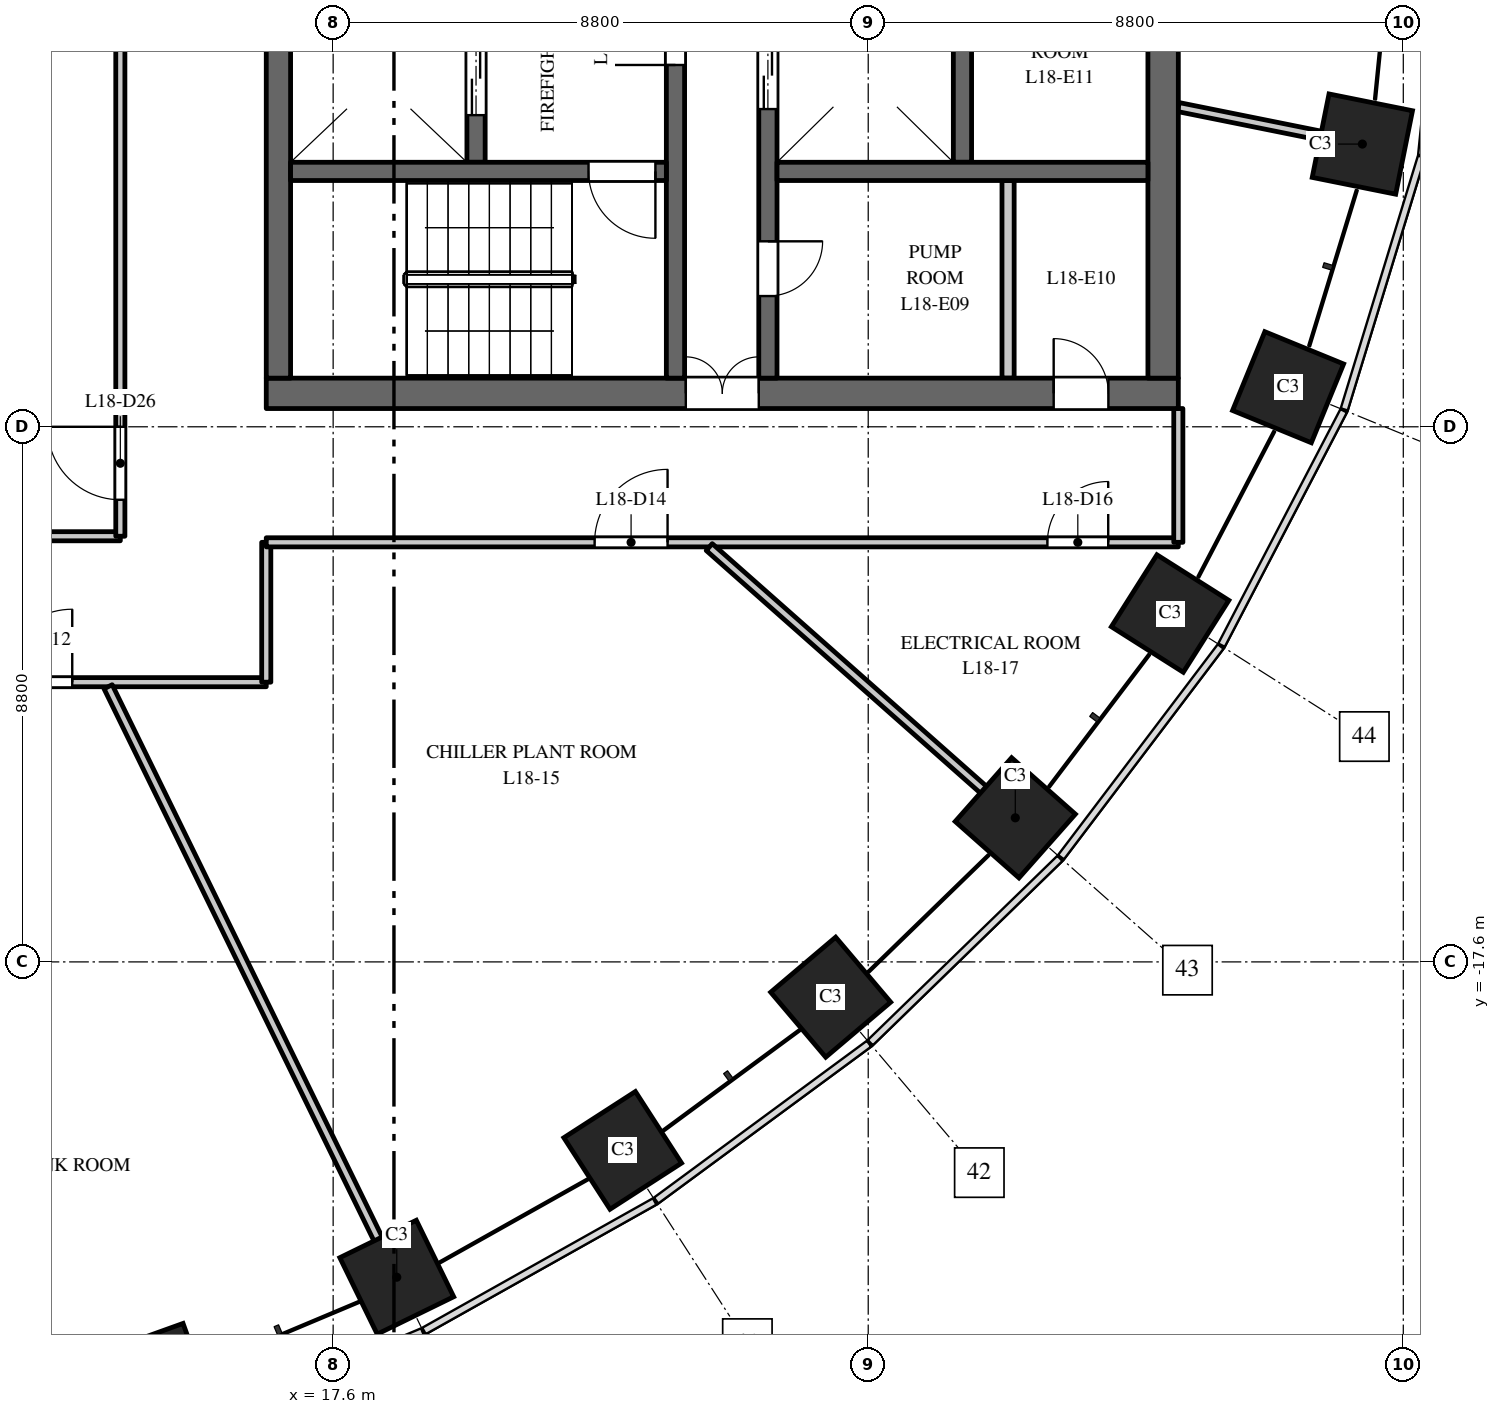
"""IFC4 building model, lengths in metres.
Left out: names, types, materials, properties, quantities, classifications, styles, units other than length and angle.
Written with IfcOpenShell. Run it as: python <this file> out.ifc"""

import sys

from ifc_helpers import new_model, si_unit, direction, frame, frame_2d, origin, origin_2d, place, context, subcontext, project, spatial, rectangle, extrude, element, fill, save


model = new_model("IFC4")
c1 = context("Model", 3, precision=1e-05, world=origin(), true_north=direction((0.0, 1.0)))
c2 = subcontext(c1, "Body", "Model", "MODEL_VIEW")
j1 = project(units=[si_unit("LENGTHUNIT", "METRE"), si_unit("PLANEANGLEUNIT", "RADIAN")], contexts=[c1])
p1 = place(None, origin())
s1 = spatial("IfcSite", under=j1, at=p1, CompositionType="ELEMENT")
p2 = place(p1, origin())
s2 = spatial("IfcBuilding", under=s1, at=p2, CompositionType="ELEMENT")
p3 = place(p2, frame((0.0, 0.0, 82.5)))
s3 = spatial("IfcBuildingStorey", under=s2, at=p3, CompositionType="ELEMENT", Elevation=82.5)
for number, where, z_axis, x_axis in (
    (1, (14.709, -24.441, 0.0), (0.0, 0.0, 1.0), (0.941, 0.338, 0.0)),
    (2, (18.646, -22.785, 0.0), (0.0, 0.0, 1.0), (0.898, 0.439, 0.0)),
    (3, (22.362, -20.7, 0.0), (0.0, 0.0, 1.0), (0.84, 0.542, 0.0)),
    (4, (25.783, -18.18, 0.0), (0.0, 0.0, 1.0), (0.763, 0.646, 0.0)),
    (5, (28.819, -15.23, 0.0), (0.0, 0.0, 1.0), (0.663, 0.749, 0.0)),
    (6, (31.365, -11.871, 0.0), (0.0, 0.0, 1.0), (0.535, 0.845, 0.0)),
    (7, (33.305, -8.149, 0.0), (0.0, 0.0, 1.0), (0.379, 0.925, 0.0)),
    (8, (34.527, -4.151, 0.0), (0.0, 0.0, 1.0), (0.197, 0.98, 0.0)),
):
    element("IfcColumn", number, at=place(p3, frame(where, z_axis=z_axis, x_axis=x_axis)), inside=s3, PredefinedType="COLUMN", context=c2, shape_type="SweptSolid", body=[
        extrude(rectangle(XDim=1.4, YDim=1.4, at=origin_2d()), origin(), (0.0, 0.0, 1.0), 5.5),
    ])
p4 = place(p3, frame((16.5, -8.25, 0.0), z_axis=(0.0, 0.0, 1.0), x_axis=(1.0, 0.0, 0.0)))
e9 = element("IfcWall", 9, at=p4, inside=s3, PredefinedType="SHEAR", context=c2, shape_type="SweptSolid", body=[
    extrude(rectangle(XDim=15.0, YDim=0.5, at=frame_2d((7.5, 0.0))), origin(), (0.0, 0.0, 1.0), 5.2),
])
p5 = place(p4, frame((6.9, 0.0, 0.0)))
e10 = element("IfcOpeningElement", 10, at=p5, cuts=e9, PredefinedType="OPENING", context=c2, shape_type="SweptSolid", body=[
    extrude(rectangle(XDim=1.2, YDim=2.1, at=frame_2d((0.6, 1.05))), frame((0.0, 0.26, 0.0), z_axis=(0.0, -1.0, 0.0), x_axis=(1.0, 0.0, 0.0)), (0.0, 0.0, 1.0), 0.52),
])
p6 = place(p4, frame((12.95, 0.0, 0.0)))
e11 = element("IfcOpeningElement", 11, at=p6, cuts=e9, PredefinedType="OPENING", context=c2, shape_type="SweptSolid", body=[
    extrude(rectangle(XDim=0.9, YDim=2.1, at=frame_2d((0.45, 1.05))), frame((0.0, 0.26, 0.0), z_axis=(0.0, -1.0, 0.0), x_axis=(1.0, 0.0, 0.0)), (0.0, 0.0, 1.0), 0.52),
])
p7 = place(p3, frame((27.95, -4.45, 0.0), z_axis=(0.0, 0.0, 1.0), x_axis=(0.0, 1.0, 0.0)))
e12 = element("IfcWall", 12, at=p7, inside=s3, PredefinedType="SHEAR", context=c2, shape_type="SweptSolid", body=[
    extrude(rectangle(XDim=8.9, YDim=0.3, at=frame_2d((4.45, 0.0))), origin(), (0.0, 0.0, 1.0), 5.2),
])
p8 = place(p3, frame((19.95, -4.45, 0.0), z_axis=(0.0, 0.0, 1.0), x_axis=(0.0, 1.0, 0.0)))
e13 = element("IfcWall", 13, at=p8, inside=s3, PredefinedType="SHEAR", context=c2, shape_type="SweptSolid", body=[
    extrude(rectangle(XDim=8.9, YDim=0.3, at=frame_2d((4.45, 0.0))), origin(), (0.0, 0.0, 1.0), 5.2),
])
p9 = place(p8, frame((0.775, 0.0, 0.0)))
e14 = element("IfcOpeningElement", 14, at=p9, cuts=e13, PredefinedType="OPENING", context=c2, shape_type="SweptSolid", body=[
    extrude(rectangle(XDim=1.2, YDim=2.1, at=frame_2d((0.6, 1.05))), frame((0.0, 0.16, 0.0), z_axis=(0.0, -1.0, 0.0), x_axis=(1.0, 0.0, 0.0)), (0.0, 0.0, 1.0), 0.32),
])
p10 = place(p8, frame((4.62, 0.0, 0.0)))
e15 = element("IfcOpeningElement", 15, at=p10, cuts=e13, PredefinedType="OPENING", context=c2, shape_type="SweptSolid", body=[
    extrude(rectangle(XDim=0.9, YDim=2.1, at=frame_2d((0.45, 1.05))), frame((0.0, 0.16, 0.0), z_axis=(0.0, -1.0, 0.0), x_axis=(1.0, 0.0, 0.0)), (0.0, 0.0, 1.0), 0.32),
])
p11 = place(p8, frame((6.975, 0.0, 0.0)))
e16 = element("IfcOpeningElement", 16, at=p11, cuts=e13, PredefinedType="OPENING", context=c2, shape_type="SweptSolid", body=[
    extrude(rectangle(XDim=0.9, YDim=2.1, at=frame_2d((0.45, 1.05))), frame((0.0, 0.16, 0.0), z_axis=(0.0, -1.0, 0.0), x_axis=(1.0, 0.0, 0.0)), (0.0, 0.0, 1.0), 0.32),
])
p12 = place(p3, frame((24.75, -8.0, 0.0), z_axis=(0.0, 0.0, 1.0), x_axis=(0.0, 1.0, 0.0)))
e17 = element("IfcWall", 17, at=p12, inside=s3, PredefinedType="SHEAR", context=c2, shape_type="SweptSolid", body=[
    extrude(rectangle(XDim=16.0, YDim=0.3, at=frame_2d((8.0, 0.0))), origin(), (0.0, 0.0, 1.0), 5.2),
])
p13 = place(p12, frame((4.425, 0.0, 0.0)))
e18 = element("IfcOpeningElement", 18, at=p13, cuts=e17, PredefinedType="OPENING", context=c2, shape_type="SweptSolid", body=[
    extrude(rectangle(XDim=1.1, YDim=2.1, at=frame_2d((0.55, 1.05))), frame((0.0, 0.16, 0.0), z_axis=(0.0, -1.0, 0.0), x_axis=(1.0, 0.0, 0.0)), (0.0, 0.0, 1.0), 0.32),
])
p14 = place(p12, frame((7.45, 0.0, 0.0)))
e19 = element("IfcOpeningElement", 19, at=p14, cuts=e17, PredefinedType="OPENING", context=c2, shape_type="SweptSolid", body=[
    extrude(rectangle(XDim=1.1, YDim=2.1, at=frame_2d((0.55, 1.05))), frame((0.0, 0.16, 0.0), z_axis=(0.0, -1.0, 0.0), x_axis=(1.0, 0.0, 0.0)), (0.0, 0.0, 1.0), 0.32),
])
p15 = place(p12, frame((10.425, 0.0, 0.0)))
e20 = element("IfcOpeningElement", 20, at=p15, cuts=e17, PredefinedType="OPENING", context=c2, shape_type="SweptSolid", body=[
    extrude(rectangle(XDim=1.2, YDim=2.1, at=frame_2d((0.6, 1.05))), frame((0.0, 0.16, 0.0), z_axis=(0.0, -1.0, 0.0), x_axis=(1.0, 0.0, 0.0)), (0.0, 0.0, 1.0), 0.32),
])
p16 = place(p12, frame((13.125, 0.0, 0.0)))
e21 = element("IfcOpeningElement", 21, at=p16, cuts=e17, PredefinedType="OPENING", context=c2, shape_type="SweptSolid", body=[
    extrude(rectangle(XDim=0.9, YDim=2.1, at=frame_2d((0.45, 1.05))), frame((0.0, 0.16, 0.0), z_axis=(0.0, -1.0, 0.0), x_axis=(1.0, 0.0, 0.0)), (0.0, 0.0, 1.0), 0.32),
])
p17 = place(p12, frame((14.75, 0.0, 0.0)))
e22 = element("IfcOpeningElement", 22, at=p17, cuts=e17, PredefinedType="OPENING", context=c2, shape_type="SweptSolid", body=[
    extrude(rectangle(XDim=0.9, YDim=2.1, at=frame_2d((0.45, 1.05))), frame((0.0, 0.16, 0.0), z_axis=(0.0, -1.0, 0.0), x_axis=(1.0, 0.0, 0.0)), (0.0, 0.0, 1.0), 0.32),
])
p18 = place(p12, frame((1.35, 0.0, 0.0)))
e23 = element("IfcOpeningElement", 23, at=p18, cuts=e17, PredefinedType="OPENING", context=c2, shape_type="SweptSolid", body=[
    extrude(rectangle(XDim=0.9, YDim=2.1, at=frame_2d((0.45, 1.05))), frame((0.0, 0.16, 0.0), z_axis=(0.0, -1.0, 0.0), x_axis=(1.0, 0.0, 0.0)), (0.0, 0.0, 1.0), 0.32),
])
p19 = place(p3, frame((16.7, -8.0, 0.0), z_axis=(0.0, 0.0, 1.0), x_axis=(0.0, 1.0, 0.0)))
e24 = element("IfcWall", 24, at=p19, inside=s3, PredefinedType="SHEAR", context=c2, shape_type="SweptSolid", body=[
    extrude(rectangle(XDim=16.0, YDim=0.4, at=frame_2d((8.0, 0.0))), origin(), (0.0, 0.0, 1.0), 5.2),
])
p20 = place(p3, frame((31.25, -8.0, 0.0), z_axis=(0.0, 0.0, 1.0), x_axis=(0.0, 1.0, 0.0)))
e25 = element("IfcWall", 25, at=p20, inside=s3, PredefinedType="SHEAR", context=c2, shape_type="SweptSolid", body=[
    extrude(rectangle(XDim=16.0, YDim=0.5, at=frame_2d((8.0, 0.0))), origin(), (0.0, 0.0, 1.0), 5.2),
])
p21 = place(p3, frame((28.7, -8.0, 0.0), z_axis=(0.0, 0.0, 1.0), x_axis=(0.0, 1.0, 0.0)))
e26 = element("IfcWall", 26, at=p21, inside=s3, PredefinedType="PARTITIONING", context=c2, shape_type="SweptSolid", body=[
    extrude(rectangle(XDim=3.25, YDim=0.2, at=frame_2d((1.625, 0.0))), origin(), (0.0, 0.0, 1.0), 5.2),
])
p22 = place(p3, frame((24.9, -4.6, 0.0), z_axis=(0.0, 0.0, 1.0), x_axis=(1.0, 0.0, 0.0)))
e27 = element("IfcWall", 27, at=p22, inside=s3, PredefinedType="SHEAR", context=c2, shape_type="SweptSolid", body=[
    extrude(rectangle(XDim=6.1, YDim=0.3, at=frame_2d((3.05, 0.0))), origin(), (0.0, 0.0, 1.0), 5.2),
])
p23 = place(p3, frame((23.23, -8.0, 0.0), z_axis=(0.0, 0.0, 1.0), x_axis=(0.0, 1.0, 0.0)))
e28 = element("IfcWall", 28, at=p23, inside=s3, PredefinedType="SHEAR", context=c2, shape_type="SweptSolid", body=[
    extrude(rectangle(XDim=7.875, YDim=0.3, at=frame_2d((3.938, 0.0))), origin(), (0.0, 0.0, 1.0), 5.2),
])
p24 = place(p23, frame((5.15, 0.0, 0.0)))
e29 = element("IfcOpeningElement", 29, at=p24, cuts=e28, PredefinedType="OPENING", context=c2, shape_type="SweptSolid", body=[
    extrude(rectangle(XDim=1.1, YDim=2.1, at=frame_2d((0.55, 1.05))), frame((0.0, 0.16, 0.0), z_axis=(0.0, -1.0, 0.0), x_axis=(1.0, 0.0, 0.0)), (0.0, 0.0, 1.0), 0.32),
])
p25 = place(p3, frame((16.9, -4.6, 0.0), z_axis=(0.0, 0.0, 1.0), x_axis=(1.0, 0.0, 0.0)))
e30 = element("IfcWall", 30, at=p25, inside=s3, PredefinedType="SHEAR", context=c2, shape_type="SweptSolid", body=[
    extrude(rectangle(XDim=6.18, YDim=0.3, at=frame_2d((3.09, 0.0))), origin(), (0.0, 0.0, 1.0), 5.2),
])
p26 = place(p25, frame((4.9, 0.0, 0.0)))
e31 = element("IfcOpeningElement", 31, at=p26, cuts=e30, PredefinedType="OPENING", context=c2, shape_type="SweptSolid", body=[
    extrude(rectangle(XDim=1.1, YDim=2.1, at=frame_2d((0.55, 1.05))), frame((0.0, 0.16, 0.0), z_axis=(0.0, -1.0, 0.0), x_axis=(1.0, 0.0, 0.0)), (0.0, 0.0, 1.0), 0.32),
])
p27 = place(p3, frame((-14.1, -10.6, 0.0), z_axis=(0.0, 0.0, 1.0), x_axis=(1.0, 0.0, 0.0)))
e32 = element("IfcWall", 32, at=p27, inside=s3, PredefinedType="PARTITIONING", context=c2, shape_type="SweptSolid", body=[
    extrude(rectangle(XDim=28.2, YDim=0.15, at=frame_2d((14.1, 0.0))), origin(), (0.0, 0.0, 1.0), 4.35),
])
p28 = place(p27, frame((8.22, 0.0, 0.0)))
e33 = element("IfcOpeningElement", 33, at=p28, cuts=e32, PredefinedType="OPENING", context=c2, shape_type="SweptSolid", body=[
    extrude(rectangle(XDim=1.0, YDim=2.1, at=frame_2d((0.5, 1.05))), frame((0.0, 0.085, 0.0), z_axis=(0.0, -1.0, 0.0), x_axis=(1.0, 0.0, 0.0)), (0.0, 0.0, 1.0), 0.17),
])
p29 = place(p27, frame((12.92, 0.0, 0.0)))
e34 = element("IfcOpeningElement", 34, at=p29, cuts=e32, PredefinedType="OPENING", context=c2, shape_type="SweptSolid", body=[
    extrude(rectangle(XDim=1.0, YDim=2.1, at=frame_2d((0.5, 1.05))), frame((0.0, 0.085, 0.0), z_axis=(0.0, -1.0, 0.0), x_axis=(1.0, 0.0, 0.0)), (0.0, 0.0, 1.0), 0.17),
])
p30 = place(p27, frame((17.62, 0.0, 0.0)))
e35 = element("IfcOpeningElement", 35, at=p30, cuts=e32, PredefinedType="OPENING", context=c2, shape_type="SweptSolid", body=[
    extrude(rectangle(XDim=1.0, YDim=2.1, at=frame_2d((0.5, 1.05))), frame((0.0, 0.085, 0.0), z_axis=(0.0, -1.0, 0.0), x_axis=(1.0, 0.0, 0.0)), (0.0, 0.0, 1.0), 0.17),
])
p31 = place(p3, frame((4.479, -13.0, 0.0), z_axis=(0.0, 0.0, 1.0), x_axis=(1.0, 0.0, 0.0)))
e36 = element("IfcWall", 36, at=p31, inside=s3, PredefinedType="PARTITIONING", context=c2, shape_type="SweptSolid", body=[
    extrude(rectangle(XDim=12.021, YDim=0.15, at=frame_2d((6.01, 0.0))), origin(), (0.0, 0.0, 1.0), 4.35),
])
p32 = place(p31, frame((7.63, 0.0, 0.0)))
e37 = element("IfcOpeningElement", 37, at=p32, cuts=e36, PredefinedType="OPENING", context=c2, shape_type="SweptSolid", body=[
    extrude(rectangle(XDim=1.2, YDim=2.1, at=frame_2d((0.6, 1.05))), frame((0.0, 0.085, 0.0), z_axis=(0.0, -1.0, 0.0), x_axis=(1.0, 0.0, 0.0)), (0.0, 0.0, 1.0), 0.17),
])
p33 = place(p3, frame((13.899, -13.075, 0.0), z_axis=(0.0, 0.0, 1.0), x_axis=(0.439201300969, -0.898388678261, 0.0)))
e38 = element("IfcWall", 38, at=p33, inside=s3, PredefinedType="PARTITIONING", context=c2, shape_type="SweptSolid", body=[
    extrude(rectangle(XDim=10.908, YDim=0.15, at=frame_2d((5.454, 0.0))), origin(), (0.0, 0.0, 1.0), 5.2),
])
p34 = place(p3, frame((14.1, -10.6, 0.0), z_axis=(0.0, 0.0, 1.0), x_axis=(0.0, 1.0, 0.0)))
e39 = element("IfcWall", 39, at=p34, inside=s3, PredefinedType="PARTITIONING", context=c2, shape_type="SweptSolid", body=[
    extrude(rectangle(XDim=21.2, YDim=0.15, at=frame_2d((10.6, 0.0))), origin(), (0.0, 0.0, 1.0), 4.25),
])
p35 = place(p34, frame((0.6, 0.0, 0.0)))
e40 = element("IfcOpeningElement", 40, at=p35, cuts=e39, PredefinedType="OPENING", context=c2, shape_type="SweptSolid", body=[
    extrude(rectangle(XDim=1.2, YDim=2.1, at=frame_2d((0.6, 1.05))), frame((0.0, 0.085, 0.0), z_axis=(0.0, -1.0, 0.0), x_axis=(1.0, 0.0, 0.0)), (0.0, 0.0, 1.0), 0.17),
])
p36 = place(p3, frame((16.5, -13.0, 0.0), z_axis=(0.0, 0.0, 1.0), x_axis=(0.0, 1.0, 0.0)))
e41 = element("IfcWall", 41, at=p36, inside=s3, PredefinedType="PARTITIONING", context=c2, shape_type="SweptSolid", body=[
    extrude(rectangle(XDim=2.3, YDim=0.15, at=frame_2d((1.15, 0.0))), origin(), (0.0, 0.0, 1.0), 5.2),
])
p37 = place(p3, frame((16.5, -10.7, 0.0), z_axis=(0.0, 0.0, 1.0), x_axis=(1.0, 0.0, 0.0)))
e42 = element("IfcWall", 42, at=p37, inside=s3, PredefinedType="PARTITIONING", context=c2, shape_type="SweptSolid", body=[
    extrude(rectangle(XDim=15.0, YDim=0.15, at=frame_2d((7.5, 0.0))), origin(), (0.0, 0.0, 1.0), 4.25),
])
p38 = place(p37, frame((5.4, 0.0, 0.0)))
e43 = element("IfcOpeningElement", 43, at=p38, cuts=e42, PredefinedType="OPENING", context=c2, shape_type="SweptSolid", body=[
    extrude(rectangle(XDim=1.2, YDim=2.1, at=frame_2d((0.6, 1.05))), frame((0.0, 0.085, 0.0), z_axis=(0.0, -1.0, 0.0), x_axis=(1.0, 0.0, 0.0)), (0.0, 0.0, 1.0), 0.17),
])
p39 = place(p37, frame((12.847, 0.0, 0.0)))
e44 = element("IfcOpeningElement", 44, at=p39, cuts=e42, PredefinedType="OPENING", context=c2, shape_type="SweptSolid", body=[
    extrude(rectangle(XDim=1.0, YDim=2.1, at=frame_2d((0.5, 1.05))), frame((0.0, 0.085, 0.0), z_axis=(0.0, -1.0, 0.0), x_axis=(1.0, 0.0, 0.0)), (0.0, 0.0, 1.0), 0.17),
])
p40 = place(p3, frame((23.785, -10.778, 0.0), z_axis=(0.0, 0.0, 1.0), x_axis=(0.748975381127, -0.662597825582, 0.0)))
e45 = element("IfcWall", 45, at=p40, inside=s3, PredefinedType="PARTITIONING", context=c2, shape_type="SweptSolid", body=[
    extrude(rectangle(XDim=6.82, YDim=0.15, at=frame_2d((3.41, 0.0))), origin(), (0.0, 0.0, 1.0), 5.2),
])
p41 = place(p3, frame((31.5, -10.7, 0.0), z_axis=(0.0, 0.0, 1.0), x_axis=(0.0, 1.0, 0.0)))
e46 = element("IfcWall", 46, at=p41, inside=s3, PredefinedType="PARTITIONING", context=c2, shape_type="SweptSolid", body=[
    extrude(rectangle(XDim=2.2, YDim=0.15, at=frame_2d((1.1, 0.0))), origin(), (0.0, 0.0, 1.0), 5.2),
])
p42 = place(p3, frame((31.5, -3.542, 0.0), z_axis=(0.0, 0.0, 1.0), x_axis=(0.98034430806, -0.197294291997, 0.0)))
e47 = element("IfcWall", 47, at=p42, inside=s3, PredefinedType="PARTITIONING", context=c2, shape_type="SweptSolid", body=[
    extrude(rectangle(XDim=3.188, YDim=0.15, at=frame_2d((1.594, 0.0))), origin(), (0.0, 0.0, 1.0), 5.2),
])
p43 = place(p9, origin())
e48 = element("IfcDoor", 48, at=p43, inside=s3, OperationType="DOUBLE_DOOR_SLIDING", PredefinedType="DOOR", context=c2, shape_type="SweptSolid", body=[
    extrude(rectangle(XDim=1.2, YDim=2.1, at=frame_2d((0.6, 1.05))), frame((0.0, 0.025, 0.0), z_axis=(0.0, -1.0, 0.0), x_axis=(1.0, 0.0, 0.0)), (0.0, 0.0, 1.0), 0.05),
])
fill(e14, e48)
p44 = place(p13, origin())
e49 = element("IfcDoor", 49, at=p44, inside=s3, OperationType="DOUBLE_DOOR_SLIDING", PredefinedType="DOOR", context=c2, shape_type="SweptSolid", body=[
    extrude(rectangle(XDim=1.1, YDim=2.1, at=frame_2d((0.55, 1.05))), frame((0.0, 0.025, 0.0), z_axis=(0.0, -1.0, 0.0), x_axis=(1.0, 0.0, 0.0)), (0.0, 0.0, 1.0), 0.05),
])
fill(e18, e49)
p45 = place(p26, origin())
e50 = element("IfcDoor", 50, at=p45, inside=s3, OperationType="SINGLE_SWING_RIGHT", PredefinedType="DOOR", context=c2, shape_type="SweptSolid", body=[
    extrude(rectangle(XDim=1.1, YDim=2.1, at=frame_2d((0.55, 1.05))), frame((0.0, 0.025, 0.0), z_axis=(0.0, -1.0, 0.0), x_axis=(1.0, 0.0, 0.0)), (0.0, 0.0, 1.0), 0.05),
])
fill(e31, e50)
p46 = place(p24, origin())
e51 = element("IfcDoor", 51, at=p46, inside=s3, OperationType="SINGLE_SWING_RIGHT", PredefinedType="DOOR", context=c2, shape_type="SweptSolid", body=[
    extrude(rectangle(XDim=1.1, YDim=2.1, at=frame_2d((0.55, 1.05))), frame((0.0, 0.025, 0.0), z_axis=(0.0, -1.0, 0.0), x_axis=(1.0, 0.0, 0.0)), (0.0, 0.0, 1.0), 0.05),
])
fill(e29, e51)
p47 = place(p5, origin())
e52 = element("IfcDoor", 52, at=p47, inside=s3, OperationType="DOUBLE_DOOR_DOUBLE_SWING", PredefinedType="DOOR", context=c2, shape_type="SweptSolid", body=[
    extrude(rectangle(XDim=1.2, YDim=2.1, at=frame_2d((0.6, 1.05))), frame((0.0, 0.025, 0.0), z_axis=(0.0, -1.0, 0.0), x_axis=(1.0, 0.0, 0.0)), (0.0, 0.0, 1.0), 0.05),
])
fill(e10, e52)
p48 = place(p18, origin())
e53 = element("IfcDoor", 53, at=p48, inside=s3, OperationType="SINGLE_SWING_RIGHT", PredefinedType="DOOR", context=c2, shape_type="SweptSolid", body=[
    extrude(rectangle(XDim=0.9, YDim=2.1, at=frame_2d((0.45, 1.05))), frame((0.0, 0.025, 0.0), z_axis=(0.0, -1.0, 0.0), x_axis=(1.0, 0.0, 0.0)), (0.0, 0.0, 1.0), 0.05),
])
fill(e23, e53)
p49 = place(p6, origin())
e54 = element("IfcDoor", 54, at=p49, inside=s3, OperationType="SINGLE_SWING_RIGHT", PredefinedType="DOOR", context=c2, shape_type="SweptSolid", body=[
    extrude(rectangle(XDim=0.9, YDim=2.1, at=frame_2d((0.45, 1.05))), frame((0.0, 0.025, 0.0), z_axis=(0.0, -1.0, 0.0), x_axis=(1.0, 0.0, 0.0)), (0.0, 0.0, 1.0), 0.05),
])
fill(e11, e54)
p50 = place(p32, origin())
e55 = element("IfcDoor", 55, at=p50, inside=s3, OperationType="SINGLE_SWING_RIGHT", PredefinedType="DOOR", context=c2, shape_type="SweptSolid", body=[
    extrude(rectangle(XDim=1.2, YDim=2.1, at=frame_2d((0.6, 1.05))), frame((0.0, 0.025, 0.0), z_axis=(0.0, -1.0, 0.0), x_axis=(1.0, 0.0, 0.0)), (0.0, 0.0, 1.0), 0.05),
])
fill(e37, e55)
p51 = place(p38, origin())
e56 = element("IfcDoor", 56, at=p51, inside=s3, OperationType="SINGLE_SWING_RIGHT", PredefinedType="DOOR", context=c2, shape_type="SweptSolid", body=[
    extrude(rectangle(XDim=1.2, YDim=2.1, at=frame_2d((0.6, 1.05))), frame((0.0, 0.025, 0.0), z_axis=(0.0, -1.0, 0.0), x_axis=(1.0, 0.0, 0.0)), (0.0, 0.0, 1.0), 0.05),
])
fill(e43, e56)
p52 = place(p39, origin())
e57 = element("IfcDoor", 57, at=p52, inside=s3, OperationType="SINGLE_SWING_RIGHT", PredefinedType="DOOR", context=c2, shape_type="SweptSolid", body=[
    extrude(rectangle(XDim=1.0, YDim=2.1, at=frame_2d((0.5, 1.05))), frame((0.0, 0.025, 0.0), z_axis=(0.0, -1.0, 0.0), x_axis=(1.0, 0.0, 0.0)), (0.0, 0.0, 1.0), 0.05),
])
fill(e44, e57)
p53 = place(p35, origin())
e58 = element("IfcDoor", 58, at=p53, inside=s3, OperationType="SINGLE_SWING_RIGHT", PredefinedType="DOOR", context=c2, shape_type="SweptSolid", body=[
    extrude(rectangle(XDim=1.2, YDim=2.1, at=frame_2d((0.6, 1.05))), frame((0.0, 0.025, 0.0), z_axis=(0.0, -1.0, 0.0), x_axis=(1.0, 0.0, 0.0)), (0.0, 0.0, 1.0), 0.05),
])
fill(e40, e58)
save(model, sys.argv[1])
